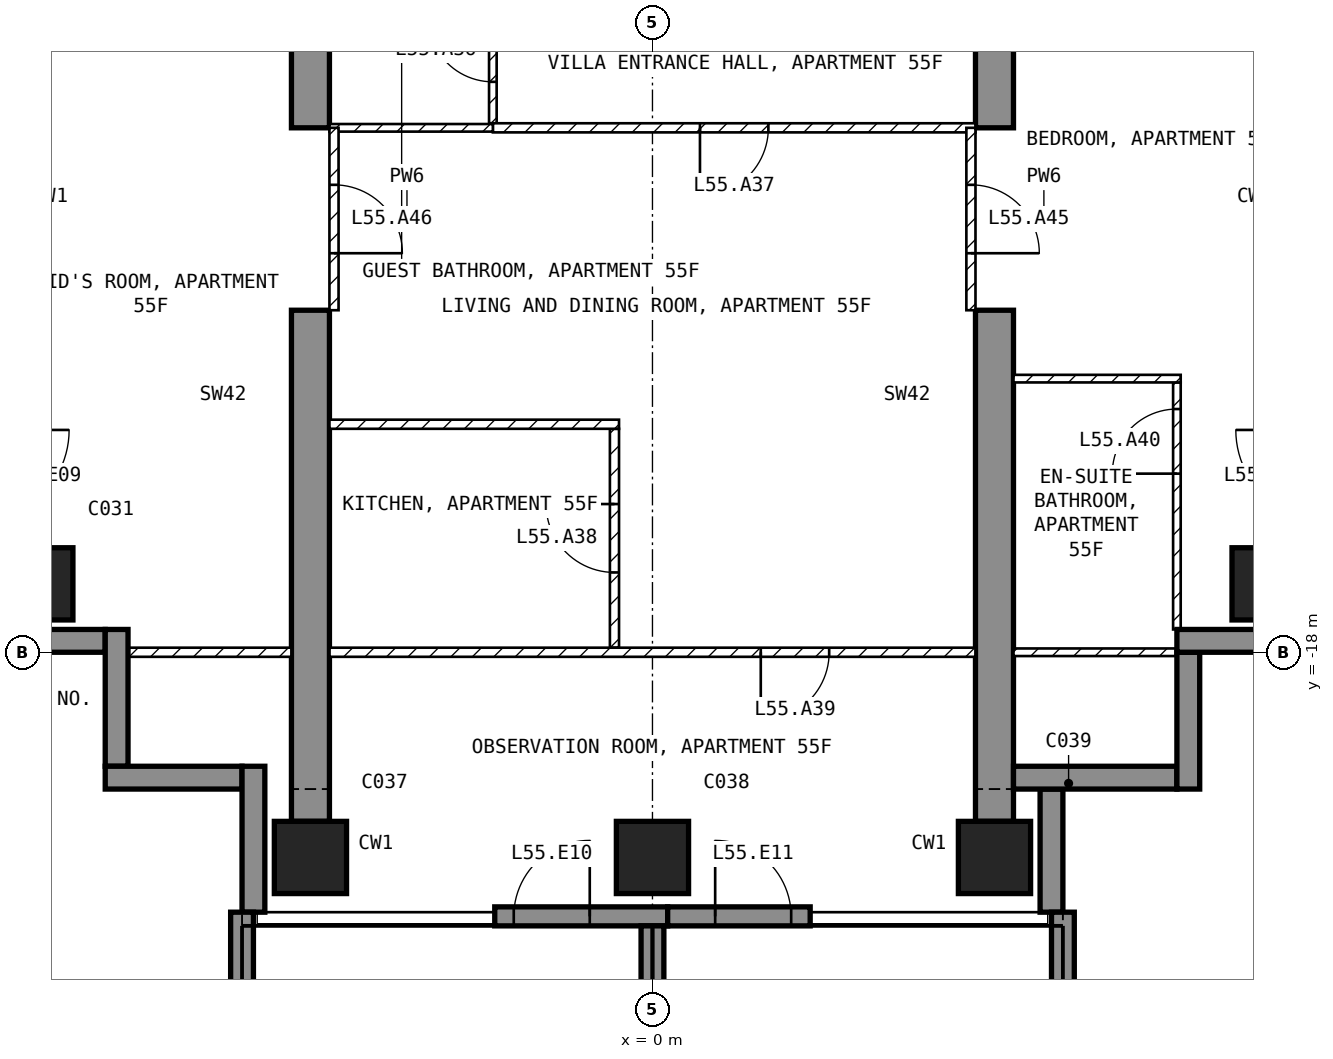
"""IFC4 building model, lengths in metres.
Left out: names, types, materials, properties, quantities, classifications, styles, units other than length and angle.
Written with IfcOpenShell. Run it as: python <this file> out.ifc"""

import sys

from ifc_helpers import new_model, si_unit, direction, frame, frame_2d, origin, origin_2d, place, context, subcontext, project, spatial, polyline, rectangle, outline, extrude, element, fill, save


model = new_model("IFC4")
c1 = context("Model", 3, precision=1e-05, world=origin(), true_north=direction((0.0, 1.0)))
c2 = subcontext(c1, "Body", "Model", "MODEL_VIEW")
j1 = project(units=[si_unit("LENGTHUNIT", "METRE"), si_unit("PLANEANGLEUNIT", "RADIAN")], contexts=[c1])
p1 = place(None, origin())
s1 = spatial("IfcSite", under=j1, at=p1, CompositionType="ELEMENT")
p2 = place(p1, origin())
s2 = spatial("IfcBuilding", under=s1, at=p2, CompositionType="ELEMENT")
p3 = place(p2, frame((0.0, 0.0, 219.1)))
s3 = spatial("IfcBuildingStorey", under=s2, at=p3, CompositionType="ELEMENT", Elevation=219.1)
for number, where, z_axis, x_axis in (
    (1, (-8.1, -17.1, -0.25), (0.0, 0.0, 1.0), (1.0, 0.0, 0.0)),
    (2, (-4.5, -20.7, -0.25), (0.0, 0.0, 1.0), (1.0, 0.0, 0.0)),
    (3, (0.0, -20.7, -0.25), (0.0, 0.0, 1.0), (1.0, 0.0, 0.0)),
    (4, (4.5, -20.7, -0.25), (0.0, 0.0, 1.0), (1.0, 0.0, 0.0)),
    (5, (8.1, -17.1, -0.25), (0.0, 0.0, 1.0), (1.0, 0.0, 0.0)),
):
    element("IfcColumn", number, at=place(p3, frame(where, z_axis=z_axis, x_axis=x_axis)), inside=s3, PredefinedType="COLUMN", context=c2, shape_type="SweptSolid", body=[
        extrude(rectangle(XDim=0.95, YDim=0.95, at=origin_2d()), origin(), (0.0, 0.0, 1.0), 3.45),
    ])
for number, where, z_axis, x_axis in (
    (6, (-4.75, -20.225, -0.25), (1.0, 0.0, 0.0), (0.0, 1.0, 0.0)),
    (7, (4.25, -20.225, -0.25), (1.0, 0.0, 0.0), (0.0, 1.0, 0.0)),
):
    element("IfcWall", number, at=place(p3, frame(where, z_axis=z_axis, x_axis=x_axis)), inside=s3, PredefinedType="SHEAR", context=c2, shape_type="SweptSolid", body=[
        extrude(outline(polyline([(0.0, 0.0), (6.725, 0.0), (6.725, 2.65), (9.125, 2.65), (9.125, 0.0), (11.225, 0.0), (11.225, 3.45), (0.0, 3.45), (0.0, 0.0)])), origin(), (0.0, 0.0, 1.0), 0.5),
    ])
p4 = place(p3, frame((-2.075, -21.475, 0.0), z_axis=(0.0, 0.0, 1.0), x_axis=(1.0, 0.0, 0.0)))
e8 = element("IfcWall", 8, at=p4, inside=s3, PredefinedType="SOLIDWALL", context=c2, shape_type="SweptSolid", body=[
    extrude(rectangle(XDim=2.275, YDim=0.25, at=frame_2d((1.137, 0.0))), origin(), (0.0, 0.0, 1.0), 3.2),
])
p5 = place(p4, frame((0.25, 0.0, 0.0)))
e9 = element("IfcOpeningElement", 9, at=p5, cuts=e8, PredefinedType="OPENING", context=c2, shape_type="SweptSolid", body=[
    extrude(rectangle(XDim=1.0, YDim=2.4, at=frame_2d((0.5, 1.2))), frame((0.0, 0.135, 0.0), z_axis=(0.0, -1.0, 0.0), x_axis=(1.0, 0.0, 0.0)), (0.0, 0.0, 1.0), 0.27),
])
p6 = place(p3, frame((0.2, -21.475, 0.0), z_axis=(0.0, 0.0, 1.0), x_axis=(1.0, 0.0, 0.0)))
e10 = element("IfcWall", 10, at=p6, inside=s3, PredefinedType="SOLIDWALL", context=c2, shape_type="SweptSolid", body=[
    extrude(rectangle(XDim=1.875, YDim=0.25, at=frame_2d((0.938, 0.0))), origin(), (0.0, 0.0, 1.0), 3.2),
])
p7 = place(p6, frame((0.625, 0.0, 0.0)))
e11 = element("IfcOpeningElement", 11, at=p7, cuts=e10, PredefinedType="OPENING", context=c2, shape_type="SweptSolid", body=[
    extrude(rectangle(XDim=1.0, YDim=2.4, at=frame_2d((0.5, 1.2))), frame((0.0, 0.135, 0.0), z_axis=(0.0, -1.0, 0.0), x_axis=(1.0, 0.0, 0.0)), (0.0, 0.0, 1.0), 0.27),
])
p8 = place(p3, frame((5.25, -21.42, 0.0), z_axis=(0.0, 0.0, 1.0), x_axis=(0.0, 1.0, 0.0)))
e12 = element("IfcWall", 12, at=p8, inside=s3, PredefinedType="SOLIDWALL", context=c2, shape_type="SweptSolid", body=[
    extrude(rectangle(XDim=1.62, YDim=0.3, at=frame_2d((0.81, 0.0))), origin(), (0.0, 0.0, 1.0), 3.2),
])
p9 = place(p3, frame((4.75, -19.65, 0.0), z_axis=(0.0, 0.0, 1.0), x_axis=(1.0, 0.0, 0.0)))
e13 = element("IfcWall", 13, at=p9, inside=s3, PredefinedType="SOLIDWALL", context=c2, shape_type="SweptSolid", body=[
    extrude(rectangle(XDim=2.15, YDim=0.3, at=frame_2d((1.075, 0.0))), origin(), (0.0, 0.0, 1.0), 3.2),
])
p10 = place(p3, frame((7.05, -19.8, 0.0), z_axis=(0.0, 0.0, 1.0), x_axis=(0.0, 1.0, 0.0)))
e14 = element("IfcWall", 14, at=p10, inside=s3, PredefinedType="SOLIDWALL", context=c2, shape_type="SweptSolid", body=[
    extrude(rectangle(XDim=1.8, YDim=0.3, at=frame_2d((0.9, 0.0))), origin(), (0.0, 0.0, 1.0), 3.2),
])
p11 = place(p3, frame((6.9, -17.85, 0.0), z_axis=(0.0, 0.0, 1.0), x_axis=(1.0, 0.0, 0.0)))
e15 = element("IfcWall", 15, at=p11, inside=s3, PredefinedType="SOLIDWALL", context=c2, shape_type="SweptSolid", body=[
    extrude(rectangle(XDim=1.85, YDim=0.3, at=frame_2d((0.925, 0.0))), origin(), (0.0, 0.0, 1.0), 3.2),
])
p12 = place(p3, frame((-8.75, -17.85, 0.0), z_axis=(0.0, 0.0, 1.0), x_axis=(1.0, 0.0, 0.0)))
e16 = element("IfcWall", 16, at=p12, inside=s3, PredefinedType="SOLIDWALL", context=c2, shape_type="SweptSolid", body=[
    extrude(rectangle(XDim=1.55, YDim=0.3, at=frame_2d((0.775, 0.0))), origin(), (0.0, 0.0, 1.0), 3.2),
])
for number, where, z_axis, x_axis in (
    (17, (-7.05, -17.7, 0.0), (0.0, 0.0, 1.0), (0.0, -1.0, 0.0)),
    (18, (-7.2, -19.65, 0.0), (0.0, 0.0, 1.0), (1.0, 0.0, 0.0)),
):
    element("IfcWall", number, at=place(p3, frame(where, z_axis=z_axis, x_axis=x_axis)), inside=s3, PredefinedType="SOLIDWALL", context=c2, shape_type="SweptSolid", body=[
        extrude(rectangle(XDim=1.8, YDim=0.3, at=frame_2d((0.9, 0.0))), origin(), (0.0, 0.0, 1.0), 3.2),
    ])
p13 = place(p3, frame((-5.25, -19.5, 0.0), z_axis=(0.0, 0.0, 1.0), x_axis=(0.0, -1.0, 0.0)))
e19 = element("IfcWall", 19, at=p13, inside=s3, PredefinedType="SOLIDWALL", context=c2, shape_type="SweptSolid", body=[
    extrude(rectangle(XDim=1.92, YDim=0.3, at=frame_2d((0.96, 0.0))), origin(), (0.0, 0.0, 1.0), 3.2),
])
p14 = place(p3, frame((-5.4, -21.42, 0.0), z_axis=(0.0, 0.0, 1.0), x_axis=(0.0, -1.0, 0.0)))
e20 = element("IfcWall", 20, at=p14, inside=s3, PredefinedType="SOLIDWALL", context=c2, shape_type="SweptSolid", body=[
    extrude(rectangle(XDim=2.88, YDim=0.3, at=frame_2d((1.44, 0.0))), origin(), (0.0, 0.0, 1.0), 3.2),
])
p15 = place(p3, frame((0.0, -21.6, 0.0), z_axis=(0.0, 0.0, 1.0), x_axis=(0.0, -1.0, 0.0)))
e21 = element("IfcWall", 21, at=p15, inside=s3, PredefinedType="SOLIDWALL", context=c2, shape_type="SweptSolid", body=[
    extrude(rectangle(XDim=2.7, YDim=0.3, at=frame_2d((1.35, 0.0))), origin(), (0.0, 0.0, 1.0), 3.2),
])
p16 = place(p3, frame((5.4, -21.42, 0.0), z_axis=(0.0, 0.0, 1.0), x_axis=(0.0, -1.0, 0.0)))
e22 = element("IfcWall", 22, at=p16, inside=s3, PredefinedType="SOLIDWALL", context=c2, shape_type="SweptSolid", body=[
    extrude(rectangle(XDim=2.88, YDim=0.3, at=frame_2d((1.44, 0.0))), origin(), (0.0, 0.0, 1.0), 3.2),
])
p17 = place(p3, frame((-2.1, -11.04, 0.0), z_axis=(0.0, 0.0, 1.0), x_axis=(0.0, 1.0, 0.0)))
e23 = element("IfcWall", 23, at=p17, inside=s3, PredefinedType="PARTITIONING", context=c2, shape_type="SweptSolid", body=[
    extrude(rectangle(XDim=1.94, YDim=0.1, at=frame_2d((0.97, 0.0))), origin(), (0.0, 0.0, 1.0), 3.2),
])
p18 = place(p17, frame((0.545, 0.0, 0.0)))
e24 = element("IfcOpeningElement", 24, at=p18, cuts=e23, PredefinedType="OPENING", context=c2, shape_type="SweptSolid", body=[
    extrude(rectangle(XDim=0.85, YDim=2.1, at=frame_2d((0.425, 1.05))), frame((0.0, 0.06, 0.0), z_axis=(0.0, -1.0, 0.0), x_axis=(1.0, 0.0, 0.0)), (0.0, 0.0, 1.0), 0.12),
])
p19 = place(p3, frame((4.25, -11.1, 0.0), z_axis=(0.0, 0.0, 1.0), x_axis=(-1.0, 0.0, 0.0)))
e25 = element("IfcWall", 25, at=p19, inside=s3, PredefinedType="PARTITIONING", context=c2, shape_type="SweptSolid", body=[
    extrude(rectangle(XDim=6.35, YDim=0.12, at=frame_2d((3.175, 0.0))), origin(), (0.0, 0.0, 1.0), 3.2),
])
p20 = place(p19, frame((2.725, 0.0, 0.0)))
e26 = element("IfcOpeningElement", 26, at=p20, cuts=e25, PredefinedType="OPENING", context=c2, shape_type="SweptSolid", body=[
    extrude(rectangle(XDim=0.9, YDim=2.1, at=frame_2d((0.45, 1.05))), frame((0.0, 0.07, 0.0), z_axis=(0.0, -1.0, 0.0), x_axis=(1.0, 0.0, 0.0)), (0.0, 0.0, 1.0), 0.14),
])
p21 = place(p3, frame((-2.1, -11.1, 0.0), z_axis=(0.0, 0.0, 1.0), x_axis=(-1.0, 0.0, 0.0)))
e27 = element("IfcWall", 27, at=p21, inside=s3, PredefinedType="PARTITIONING", context=c2, shape_type="SweptSolid", body=[
    extrude(rectangle(XDim=2.15, YDim=0.1, at=frame_2d((1.075, 0.0))), origin(), (0.0, 0.0, 1.0), 3.2),
])
p22 = place(p3, frame((-0.5, -17.94, 0.0), z_axis=(0.0, 0.0, 1.0), x_axis=(0.0, 1.0, 0.0)))
e28 = element("IfcWall", 28, at=p22, inside=s3, PredefinedType="PARTITIONING", context=c2, shape_type="SweptSolid", body=[
    extrude(rectangle(XDim=2.88, YDim=0.12, at=frame_2d((1.44, 0.0))), origin(), (0.0, 0.0, 1.0), 3.2),
])
p23 = place(p22, frame((0.99, 0.0, 0.0)))
e29 = element("IfcOpeningElement", 29, at=p23, cuts=e28, PredefinedType="OPENING", context=c2, shape_type="SweptSolid", body=[
    extrude(rectangle(XDim=0.9, YDim=2.1, at=frame_2d((0.45, 1.05))), frame((0.0, 0.07, 0.0), z_axis=(0.0, -1.0, 0.0), x_axis=(1.0, 0.0, 0.0)), (0.0, 0.0, 1.0), 0.14),
])
p24 = place(p3, frame((-0.44, -15.0, 0.0), z_axis=(0.0, 0.0, 1.0), x_axis=(-1.0, 0.0, 0.0)))
e30 = element("IfcWall", 30, at=p24, inside=s3, PredefinedType="PARTITIONING", context=c2, shape_type="SweptSolid", body=[
    extrude(rectangle(XDim=3.81, YDim=0.12, at=frame_2d((1.905, 0.0))), origin(), (0.0, 0.0, 1.0), 3.2),
])
p25 = place(p3, frame((4.25, -18.0, 0.0), z_axis=(0.0, 0.0, 1.0), x_axis=(-1.0, 0.0, 0.0)))
e31 = element("IfcWall", 31, at=p25, inside=s3, PredefinedType="PARTITIONING", context=c2, shape_type="SweptSolid", body=[
    extrude(rectangle(XDim=8.5, YDim=0.12, at=frame_2d((4.25, 0.0))), origin(), (0.0, 0.0, 1.0), 3.2),
])
p26 = place(p25, frame((1.925, 0.0, 0.0)))
e32 = element("IfcOpeningElement", 32, at=p26, cuts=e31, PredefinedType="OPENING", context=c2, shape_type="SweptSolid", body=[
    extrude(rectangle(XDim=0.9, YDim=2.1, at=frame_2d((0.45, 1.05))), frame((0.0, 0.07, 0.0), z_axis=(0.0, -1.0, 0.0), x_axis=(1.0, 0.0, 0.0)), (0.0, 0.0, 1.0), 0.14),
])
p27 = place(p3, frame((6.9, -17.7, 0.0), z_axis=(0.0, 0.0, 1.0), x_axis=(0.0, 1.0, 0.0)))
e33 = element("IfcWall", 33, at=p27, inside=s3, PredefinedType="PARTITIONING", context=c2, shape_type="SweptSolid", body=[
    extrude(rectangle(XDim=3.25, YDim=0.1, at=frame_2d((1.625, 0.0))), origin(), (0.0, 0.0, 1.0), 3.2),
])
p28 = place(p27, frame((2.05, 0.0, 0.0)))
e34 = element("IfcOpeningElement", 34, at=p28, cuts=e33, PredefinedType="OPENING", context=c2, shape_type="SweptSolid", body=[
    extrude(rectangle(XDim=0.85, YDim=2.1, at=frame_2d((0.425, 1.05))), frame((0.0, 0.06, 0.0), z_axis=(0.0, -1.0, 0.0), x_axis=(1.0, 0.0, 0.0)), (0.0, 0.0, 1.0), 0.12),
])
p29 = place(p3, frame((6.95, -14.4, 0.0), z_axis=(0.0, 0.0, 1.0), x_axis=(-1.0, 0.0, 0.0)))
e35 = element("IfcWall", 35, at=p29, inside=s3, PredefinedType="PARTITIONING", context=c2, shape_type="SweptSolid", body=[
    extrude(rectangle(XDim=2.2, YDim=0.1, at=frame_2d((1.1, 0.0))), origin(), (0.0, 0.0, 1.0), 3.2),
])
p30 = place(p3, frame((7.12, -18.0, 0.0), z_axis=(0.0, 0.0, 1.0), x_axis=(-1.0, 0.0, 0.0)))
e36 = element("IfcWall", 36, at=p30, inside=s3, PredefinedType="PARTITIONING", context=c2, shape_type="SweptSolid", body=[
    extrude(rectangle(XDim=2.37, YDim=0.1, at=frame_2d((1.185, 0.0))), origin(), (0.0, 0.0, 1.0), 3.2),
])
p31 = place(p3, frame((-4.75, -18.0, 0.0), z_axis=(0.0, 0.0, 1.0), x_axis=(-1.0, 0.0, 0.0)))
e37 = element("IfcWall", 37, at=p31, inside=s3, PredefinedType="PARTITIONING", context=c2, shape_type="SweptSolid", body=[
    extrude(rectangle(XDim=2.37, YDim=0.12, at=frame_2d((1.185, 0.0))), origin(), (0.0, 0.0, 1.0), 3.2),
])
p32 = place(p3, frame((4.19, -11.1, 0.0), z_axis=(0.0, 0.0, 1.0), x_axis=(0.0, -1.0, 0.0)))
e38 = element("IfcWall", 38, at=p32, inside=s3, PredefinedType="PARTITIONING", context=c2, shape_type="SweptSolid", body=[
    extrude(rectangle(XDim=2.4, YDim=0.12, at=frame_2d((1.2, 0.0))), origin(), (0.0, 0.0, 1.0), 2.4),
])
p33 = place(p32, frame((0.75, 0.0, 0.0)))
e39 = element("IfcOpeningElement", 39, at=p33, cuts=e38, PredefinedType="OPENING", context=c2, shape_type="SweptSolid", body=[
    extrude(rectangle(XDim=0.9, YDim=2.1, at=frame_2d((0.45, 1.05))), frame((0.0, 0.07, 0.0), z_axis=(0.0, -1.0, 0.0), x_axis=(1.0, 0.0, 0.0)), (0.0, 0.0, 1.0), 0.14),
])
p34 = place(p3, frame((-4.19, -11.1, 0.0), z_axis=(0.0, 0.0, 1.0), x_axis=(0.0, -1.0, 0.0)))
e40 = element("IfcWall", 40, at=p34, inside=s3, PredefinedType="PARTITIONING", context=c2, shape_type="SweptSolid", body=[
    extrude(rectangle(XDim=2.4, YDim=0.12, at=frame_2d((1.2, 0.0))), origin(), (0.0, 0.0, 1.0), 2.4),
])
p35 = place(p34, frame((0.75, 0.0, 0.0)))
e41 = element("IfcOpeningElement", 41, at=p35, cuts=e40, PredefinedType="OPENING", context=c2, shape_type="SweptSolid", body=[
    extrude(rectangle(XDim=0.9, YDim=2.1, at=frame_2d((0.45, 1.05))), frame((0.0, 0.07, 0.0), z_axis=(0.0, -1.0, 0.0), x_axis=(1.0, 0.0, 0.0)), (0.0, 0.0, 1.0), 0.14),
])
p36 = place(p5, origin())
e42 = element("IfcDoor", 42, at=p36, inside=s3, OperationType="SINGLE_SWING_RIGHT", PredefinedType="DOOR", context=c2, shape_type="SweptSolid", body=[
    extrude(rectangle(XDim=1.0, YDim=2.4, at=frame_2d((0.5, 1.2))), frame((0.0, 0.025, 0.0), z_axis=(0.0, -1.0, 0.0), x_axis=(1.0, 0.0, 0.0)), (0.0, 0.0, 1.0), 0.05),
])
fill(e9, e42)
p37 = place(p7, origin())
e43 = element("IfcDoor", 43, at=p37, inside=s3, OperationType="SINGLE_SWING_LEFT", PredefinedType="DOOR", context=c2, shape_type="SweptSolid", body=[
    extrude(rectangle(XDim=1.0, YDim=2.4, at=frame_2d((0.5, 1.2))), frame((0.0, 0.025, 0.0), z_axis=(0.0, -1.0, 0.0), x_axis=(1.0, 0.0, 0.0)), (0.0, 0.0, 1.0), 0.05),
])
fill(e11, e43)
p38 = place(p18, origin())
e44 = element("IfcDoor", 44, at=p38, inside=s3, OperationType="SINGLE_SWING_RIGHT", PredefinedType="DOOR", context=c2, shape_type="SweptSolid", body=[
    extrude(rectangle(XDim=0.85, YDim=2.1, at=frame_2d((0.425, 1.05))), frame((0.0, 0.025, 0.0), z_axis=(0.0, -1.0, 0.0), x_axis=(1.0, 0.0, 0.0)), (0.0, 0.0, 1.0), 0.05),
])
fill(e24, e44)
p39 = place(p20, origin())
e45 = element("IfcDoor", 45, at=p39, inside=s3, OperationType="SINGLE_SWING_RIGHT", PredefinedType="DOOR", context=c2, shape_type="SweptSolid", body=[
    extrude(rectangle(XDim=0.9, YDim=2.1, at=frame_2d((0.45, 1.05))), frame((0.0, 0.025, 0.0), z_axis=(0.0, -1.0, 0.0), x_axis=(1.0, 0.0, 0.0)), (0.0, 0.0, 1.0), 0.05),
])
fill(e26, e45)
p40 = place(p23, origin())
e46 = element("IfcDoor", 46, at=p40, inside=s3, OperationType="SINGLE_SWING_RIGHT", PredefinedType="DOOR", context=c2, shape_type="SweptSolid", body=[
    extrude(rectangle(XDim=0.9, YDim=2.1, at=frame_2d((0.45, 1.05))), frame((0.0, 0.025, 0.0), z_axis=(0.0, -1.0, 0.0), x_axis=(1.0, 0.0, 0.0)), (0.0, 0.0, 1.0), 0.05),
])
fill(e29, e46)
p41 = place(p26, origin())
e47 = element("IfcDoor", 47, at=p41, inside=s3, OperationType="SINGLE_SWING_RIGHT", PredefinedType="DOOR", context=c2, shape_type="SweptSolid", body=[
    extrude(rectangle(XDim=0.9, YDim=2.1, at=frame_2d((0.45, 1.05))), frame((0.0, 0.025, 0.0), z_axis=(0.0, -1.0, 0.0), x_axis=(1.0, 0.0, 0.0)), (0.0, 0.0, 1.0), 0.05),
])
fill(e32, e47)
p42 = place(p28, origin())
e48 = element("IfcDoor", 48, at=p42, inside=s3, OperationType="SINGLE_SWING_LEFT", PredefinedType="DOOR", context=c2, shape_type="SweptSolid", body=[
    extrude(rectangle(XDim=0.85, YDim=2.1, at=frame_2d((0.425, 1.05))), frame((0.0, 0.025, 0.0), z_axis=(0.0, -1.0, 0.0), x_axis=(1.0, 0.0, 0.0)), (0.0, 0.0, 1.0), 0.05),
])
fill(e34, e48)
p43 = place(p33, origin())
e49 = element("IfcDoor", 49, at=p43, inside=s3, OperationType="SINGLE_SWING_RIGHT", PredefinedType="DOOR", context=c2, shape_type="SweptSolid", body=[
    extrude(rectangle(XDim=0.9, YDim=2.1, at=frame_2d((0.45, 1.05))), frame((0.0, 0.025, 0.0), z_axis=(0.0, -1.0, 0.0), x_axis=(1.0, 0.0, 0.0)), (0.0, 0.0, 1.0), 0.05),
])
fill(e39, e49)
p44 = place(p35, origin())
e50 = element("IfcDoor", 50, at=p44, inside=s3, OperationType="SINGLE_SWING_RIGHT", PredefinedType="DOOR", context=c2, shape_type="SweptSolid", body=[
    extrude(rectangle(XDim=0.9, YDim=2.1, at=frame_2d((0.45, 1.05))), frame((0.0, 0.025, 0.0), z_axis=(0.0, -1.0, 0.0), x_axis=(1.0, 0.0, 0.0)), (0.0, 0.0, 1.0), 0.05),
])
fill(e41, e50)
save(model, sys.argv[1])
